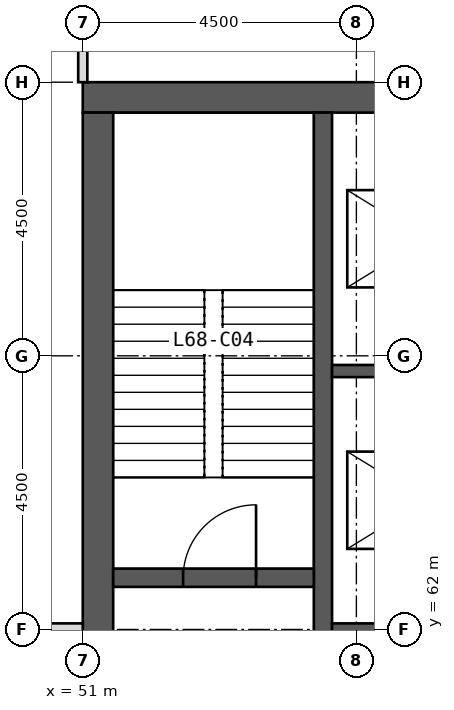
"""IFC4 building model, lengths in metres.
Left out: names, types, materials, properties, quantities, classifications, styles, units other than length and angle.
Written with IfcOpenShell. Run it as: python <this file> out.ifc"""

import sys

from ifc_helpers import new_model, si_unit, direction, frame, frame_2d, origin, place, context, subcontext, project, spatial, rectangle, extrude, element, fill, save


model = new_model("IFC4")
c1 = context("Model", 3, precision=1e-05, world=origin(), true_north=direction((0.0, 1.0)))
c2 = subcontext(c1, "Body", "Model", "MODEL_VIEW")
j1 = project(units=[si_unit("LENGTHUNIT", "METRE"), si_unit("PLANEANGLEUNIT", "RADIAN")], contexts=[c1])
p1 = place(None, origin())
s1 = spatial("IfcSite", under=j1, at=p1, CompositionType="ELEMENT")
p2 = place(p1, origin())
s2 = spatial("IfcBuilding", under=s1, at=p2, CompositionType="ELEMENT")
p3 = place(p2, frame((0.0, 0.0, 282.0)))
s3 = spatial("IfcBuildingStorey", under=s2, at=p3, CompositionType="ELEMENT", Elevation=282.0)
p4 = place(p3, frame((51.0, 70.75, 0.0), z_axis=(0.0, 0.0, 1.0), x_axis=(1.0, 0.0, 0.0)))
e1 = element("IfcWall", 1, at=p4, inside=s3, PredefinedType="SHEAR", context=c2, shape_type="SweptSolid", body=[
    extrude(rectangle(XDim=18.0, YDim=0.5, at=frame_2d((9.0, 0.0))), origin(), (0.0, 0.0, 1.0), 4.0),
])
p5 = place(p4, frame((8.1, 0.0, 0.0)))
e2 = element("IfcOpeningElement", 2, at=p5, cuts=e1, PredefinedType="OPENING", context=c2, shape_type="SweptSolid", body=[
    extrude(rectangle(XDim=1.8, YDim=2.2, at=frame_2d((0.9, 1.1))), frame((0.0, 0.26, 0.0), z_axis=(0.0, -1.0, 0.0), x_axis=(1.0, 0.0, 0.0)), (0.0, 0.0, 1.0), 0.52),
])
p6 = place(p3, frame((51.25, 53.5, 0.0), z_axis=(0.0, 0.0, 1.0), x_axis=(0.0, 1.0, 0.0)))
e3 = element("IfcWall", 3, at=p6, inside=s3, PredefinedType="SHEAR", context=c2, shape_type="SweptSolid", body=[
    extrude(rectangle(XDim=17.0, YDim=0.5, at=frame_2d((8.5, 0.0))), origin(), (0.0, 0.0, 1.0), 4.0),
])
p7 = place(p6, frame((6.1, 0.0, 0.0)))
e4 = element("IfcOpeningElement", 4, at=p7, cuts=e3, PredefinedType="OPENING", context=c2, shape_type="SweptSolid", body=[
    extrude(rectangle(XDim=1.5, YDim=2.2, at=frame_2d((0.75, 1.1))), frame((0.0, 0.26, 0.0), z_axis=(0.0, -1.0, 0.0), x_axis=(1.0, 0.0, 0.0)), (0.0, 0.0, 1.0), 0.52),
])
p8 = place(p3, frame((54.95, 53.5, 0.0), z_axis=(0.0, 0.0, 1.0), x_axis=(0.0, 1.0, 0.0)))
e5 = element("IfcWall", 5, at=p8, inside=s3, PredefinedType="SHEAR", context=c2, shape_type="SweptSolid", body=[
    extrude(rectangle(XDim=17.0, YDim=0.3, at=frame_2d((8.5, 0.0))), origin(), (0.0, 0.0, 1.0), 4.0),
])
for number, where, z_axis, x_axis in (
    (6, (55.1, 62.0, 0.0), (0.0, 0.0, 1.0), (1.0, 0.0, 0.0)),
    (7, (55.1, 66.25, 0.0), (0.0, 0.0, 1.0), (1.0, 0.0, 0.0)),
):
    element("IfcWall", number, at=place(p3, frame(where, z_axis=z_axis, x_axis=x_axis)), inside=s3, PredefinedType="SHEAR", context=c2, shape_type="SweptSolid", body=[
        extrude(rectangle(XDim=3.05, YDim=0.2, at=frame_2d((1.525, 0.0))), origin(), (0.0, 0.0, 1.0), 4.0),
    ])
p9 = place(p3, frame((51.5, 62.85, 0.0), z_axis=(0.0, 0.0, 1.0), x_axis=(1.0, 0.0, 0.0)))
e8 = element("IfcWall", 8, at=p9, inside=s3, PredefinedType="SHEAR", context=c2, shape_type="SweptSolid", body=[
    extrude(rectangle(XDim=3.3, YDim=0.3, at=frame_2d((1.65, 0.0))), origin(), (0.0, 0.0, 1.0), 4.0),
])
p10 = place(p9, frame((1.15, 0.0, 0.0)))
e9 = element("IfcOpeningElement", 9, at=p10, cuts=e8, PredefinedType="OPENING", context=c2, shape_type="SweptSolid", body=[
    extrude(rectangle(XDim=1.2, YDim=2.1, at=frame_2d((0.6, 1.05))), frame((0.0, 0.16, 0.0), z_axis=(0.0, -1.0, 0.0), x_axis=(1.0, 0.0, 0.0)), (0.0, 0.0, 1.0), 0.32),
])
p11 = place(p3, frame((51.0, 71.0, 0.0), z_axis=(0.0, 0.0, 1.0), x_axis=(0.0, 1.0, 0.0)))
e10 = element("IfcWall", 10, at=p11, inside=s3, PredefinedType="PARTITIONING", context=c2, shape_type="SweptSolid", body=[
    extrude(rectangle(XDim=1.5, YDim=0.15, at=frame_2d((0.75, 0.0))), origin(), (0.0, 0.0, 1.0), 3.75),
])
p12 = place(p3, frame((51.0, 62.0, 0.0), z_axis=(0.0, 0.0, 1.0), x_axis=(-1.0, 0.0, 0.0)))
e11 = element("IfcWall", 11, at=p12, inside=s3, PredefinedType="SOLIDWALL", context=c2, shape_type="SweptSolid", body=[
    extrude(rectangle(XDim=1.5, YDim=0.2, at=frame_2d((0.75, 0.0))), origin(), (0.0, 0.0, 1.0), 2.75),
])
p13 = place(p10, origin())
e12 = element("IfcDoor", 12, at=p13, inside=s3, OperationType="SINGLE_SWING_RIGHT", PredefinedType="DOOR", context=c2, shape_type="SweptSolid", body=[
    extrude(rectangle(XDim=1.2, YDim=2.1, at=frame_2d((0.6, 1.05))), frame((0.0, 0.025, 0.0), z_axis=(0.0, -1.0, 0.0), x_axis=(1.0, 0.0, 0.0)), (0.0, 0.0, 1.0), 0.05),
])
fill(e9, e12)
save(model, sys.argv[1])
